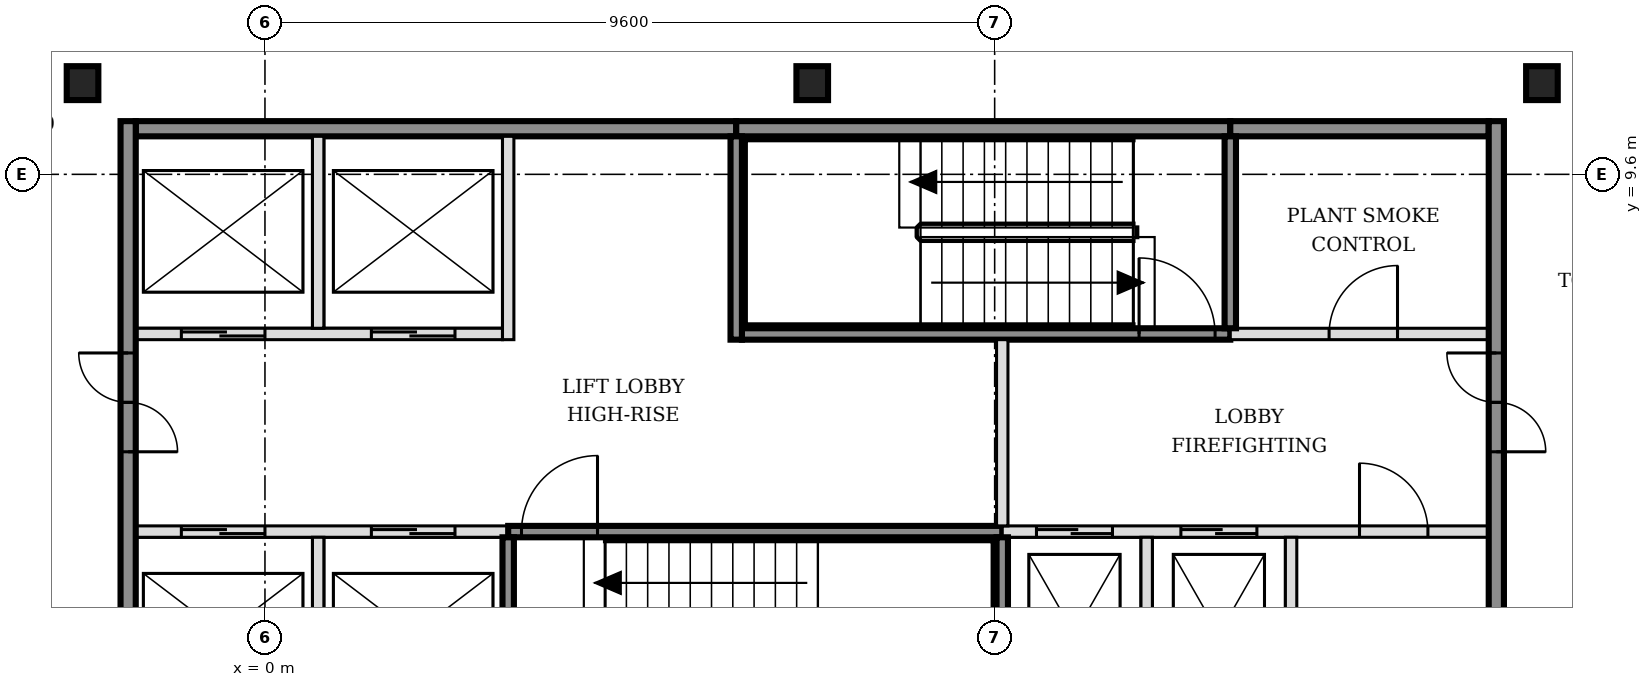
"""IFC4 building model, lengths in metres.
Left out: names, types, materials, properties, quantities, classifications, styles, units other than length and angle.
Written with IfcOpenShell. Run it as: python <this file> out.ifc"""

import sys

from ifc_helpers import new_model, si_unit, direction, frame, frame_2d, origin, origin_2d, place, context, subcontext, project, spatial, rectangle, i_section, extrude, element, fill, save


model = new_model("IFC4")
c1 = context("Model", 3, precision=1e-05, world=origin(), true_north=direction((0.0, 1.0)))
c2 = subcontext(c1, "Body", "Model", "MODEL_VIEW")
j1 = project(units=[si_unit("LENGTHUNIT", "METRE"), si_unit("PLANEANGLEUNIT", "RADIAN")], contexts=[c1])
p1 = place(None, origin())
s1 = spatial("IfcSite", under=j1, at=p1, CompositionType="ELEMENT")
p2 = place(p1, origin())
s2 = spatial("IfcBuilding", under=s1, at=p2, CompositionType="ELEMENT")
p3 = place(p2, frame((0.0, 0.0, 179.4)))
s3 = spatial("IfcBuildingStorey", under=s2, at=p3, CompositionType="ELEMENT", Elevation=179.4)
for number, where, z_axis, x_axis in (
    (1, (-2.4, 10.8, -0.15), (0.0, 0.0, 1.0), (1.0, 0.0, 0.0)),
    (2, (7.2, 10.8, -0.15), (0.0, 0.0, 1.0), (1.0, 0.0, 0.0)),
    (3, (16.8, 10.8, -0.15), (0.0, 0.0, 1.0), (1.0, 0.0, 0.0)),
):
    element("IfcColumn", number, at=place(p3, frame(where, z_axis=z_axis, x_axis=x_axis)), inside=s3, PredefinedType="COLUMN", context=c2, shape_type="SweptSolid", body=[
        extrude(i_section(OverallWidth=0.416, OverallDepth=0.446, WebThickness=0.039, FlangeThickness=0.063, FilletRadius=0.015, at=origin_2d()), origin(), (0.0, 0.0, 1.0), 3.6),
    ])
p4 = place(p3, frame((-1.7, 4.9, 0.0), z_axis=(0.0, 0.0, 1.0), x_axis=(1.0, 0.0, 0.0)))
e4 = element("IfcWall", 4, at=p4, inside=s3, PredefinedType="SOLIDWALL", context=c2, shape_type="SweptSolid", body=[
    extrude(rectangle(XDim=4.9, YDim=0.15, at=frame_2d((2.45, 0.0))), origin(), (0.0, 0.0, 1.0), 3.45),
])
p5 = place(p4, frame((0.6, 0.0, 0.0)))
e5 = element("IfcOpeningElement", 5, at=p5, cuts=e4, PredefinedType="OPENING", context=c2, shape_type="SweptSolid", body=[
    extrude(rectangle(XDim=1.1, YDim=2.1, at=frame_2d((0.55, 1.05))), frame((0.0, 0.085, 0.0), z_axis=(0.0, -1.0, 0.0), x_axis=(1.0, 0.0, 0.0)), (0.0, 0.0, 1.0), 0.17),
])
p6 = place(p4, frame((3.1, 0.0, 0.0)))
e6 = element("IfcOpeningElement", 6, at=p6, cuts=e4, PredefinedType="OPENING", context=c2, shape_type="SweptSolid", body=[
    extrude(rectangle(XDim=1.1, YDim=2.1, at=frame_2d((0.55, 1.05))), frame((0.0, 0.085, 0.0), z_axis=(0.0, -1.0, 0.0), x_axis=(1.0, 0.0, 0.0)), (0.0, 0.0, 1.0), 0.17),
])
p7 = place(p3, frame((3.2, 4.9, 0.0), z_axis=(0.0, 0.0, 1.0), x_axis=(1.0, 0.0, 0.0)))
e7 = element("IfcWall", 7, at=p7, inside=s3, PredefinedType="SOLIDWALL", context=c2, shape_type="SweptSolid", body=[
    extrude(rectangle(XDim=6.5, YDim=0.15, at=frame_2d((3.25, 0.0))), origin(), (0.0, 0.0, 1.0), 3.45),
])
p8 = place(p7, frame((0.175, 0.0, 0.0)))
e8 = element("IfcOpeningElement", 8, at=p8, cuts=e7, PredefinedType="OPENING", context=c2, shape_type="SweptSolid", body=[
    extrude(rectangle(XDim=1.0, YDim=2.1, at=frame_2d((0.5, 1.05))), frame((0.0, 0.085, 0.0), z_axis=(0.0, -1.0, 0.0), x_axis=(1.0, 0.0, 0.0)), (0.0, 0.0, 1.0), 0.17),
])
p9 = place(p3, frame((9.7, 4.9, 0.0), z_axis=(0.0, 0.0, 1.0), x_axis=(1.0, 0.0, 0.0)))
e9 = element("IfcWall", 9, at=p9, inside=s3, PredefinedType="SOLIDWALL", context=c2, shape_type="SweptSolid", body=[
    extrude(rectangle(XDim=6.4, YDim=0.15, at=frame_2d((3.2, 0.0))), origin(), (0.0, 0.0, 1.0), 3.45),
])
p10 = place(p9, frame((0.45, 0.0, 0.0)))
e10 = element("IfcOpeningElement", 10, at=p10, cuts=e9, PredefinedType="OPENING", context=c2, shape_type="SweptSolid", body=[
    extrude(rectangle(XDim=1.0, YDim=2.1, at=frame_2d((0.5, 1.05))), frame((0.0, 0.085, 0.0), z_axis=(0.0, -1.0, 0.0), x_axis=(1.0, 0.0, 0.0)), (0.0, 0.0, 1.0), 0.17),
])
p11 = place(p9, frame((2.35, 0.0, 0.0)))
e11 = element("IfcOpeningElement", 11, at=p11, cuts=e9, PredefinedType="OPENING", context=c2, shape_type="SweptSolid", body=[
    extrude(rectangle(XDim=1.0, YDim=2.1, at=frame_2d((0.5, 1.05))), frame((0.0, 0.085, 0.0), z_axis=(0.0, -1.0, 0.0), x_axis=(1.0, 0.0, 0.0)), (0.0, 0.0, 1.0), 0.17),
])
p12 = place(p9, frame((4.7, 0.0, 0.0)))
e12 = element("IfcOpeningElement", 12, at=p12, cuts=e9, PredefinedType="OPENING", context=c2, shape_type="SweptSolid", body=[
    extrude(rectangle(XDim=0.9, YDim=2.1, at=frame_2d((0.45, 1.05))), frame((0.0, 0.085, 0.0), z_axis=(0.0, -1.0, 0.0), x_axis=(1.0, 0.0, 0.0)), (0.0, 0.0, 1.0), 0.17),
])
p13 = place(p3, frame((-1.7, 7.5, 0.0), z_axis=(0.0, 0.0, 1.0), x_axis=(1.0, 0.0, 0.0)))
e13 = element("IfcWall", 13, at=p13, inside=s3, PredefinedType="SOLIDWALL", context=c2, shape_type="SweptSolid", body=[
    extrude(rectangle(XDim=4.825, YDim=0.15, at=frame_2d((2.413, 0.0))), origin(), (0.0, 0.0, 1.0), 3.45),
])
p14 = place(p13, frame((0.6, 0.0, 0.0)))
e14 = element("IfcOpeningElement", 14, at=p14, cuts=e13, PredefinedType="OPENING", context=c2, shape_type="SweptSolid", body=[
    extrude(rectangle(XDim=1.1, YDim=2.1, at=frame_2d((0.55, 1.05))), frame((0.0, 0.085, 0.0), z_axis=(0.0, -1.0, 0.0), x_axis=(1.0, 0.0, 0.0)), (0.0, 0.0, 1.0), 0.17),
])
p15 = place(p13, frame((3.1, 0.0, 0.0)))
e15 = element("IfcOpeningElement", 15, at=p15, cuts=e13, PredefinedType="OPENING", context=c2, shape_type="SweptSolid", body=[
    extrude(rectangle(XDim=1.1, YDim=2.1, at=frame_2d((0.55, 1.05))), frame((0.0, 0.085, 0.0), z_axis=(0.0, -1.0, 0.0), x_axis=(1.0, 0.0, 0.0)), (0.0, 0.0, 1.0), 0.17),
])
p16 = place(p3, frame((6.275, 7.5, 0.0), z_axis=(0.0, 0.0, 1.0), x_axis=(1.0, 0.0, 0.0)))
e16 = element("IfcWall", 16, at=p16, inside=s3, PredefinedType="SOLIDWALL", context=c2, shape_type="SweptSolid", body=[
    extrude(rectangle(XDim=6.425, YDim=0.15, at=frame_2d((3.212, 0.0))), origin(), (0.0, 0.0, 1.0), 3.45),
])
p17 = place(p16, frame((5.225, 0.0, 0.0)))
e17 = element("IfcOpeningElement", 17, at=p17, cuts=e16, PredefinedType="OPENING", context=c2, shape_type="SweptSolid", body=[
    extrude(rectangle(XDim=1.0, YDim=2.1, at=frame_2d((0.5, 1.05))), frame((0.0, 0.085, 0.0), z_axis=(0.0, -1.0, 0.0), x_axis=(1.0, 0.0, 0.0)), (0.0, 0.0, 1.0), 0.17),
])
p18 = place(p3, frame((12.7, 7.5, 0.0), z_axis=(0.0, 0.0, 1.0), x_axis=(1.0, 0.0, 0.0)))
e18 = element("IfcWall", 18, at=p18, inside=s3, PredefinedType="SOLIDWALL", context=c2, shape_type="SweptSolid", body=[
    extrude(rectangle(XDim=3.4, YDim=0.15, at=frame_2d((1.7, 0.0))), origin(), (0.0, 0.0, 1.0), 3.45),
])
p19 = place(p18, frame((1.3, 0.0, 0.0)))
e19 = element("IfcOpeningElement", 19, at=p19, cuts=e18, PredefinedType="OPENING", context=c2, shape_type="SweptSolid", body=[
    extrude(rectangle(XDim=0.9, YDim=2.1, at=frame_2d((0.45, 1.05))), frame((0.0, 0.085, 0.0), z_axis=(0.0, -1.0, 0.0), x_axis=(1.0, 0.0, 0.0)), (0.0, 0.0, 1.0), 0.17),
])
p20 = place(p3, frame((-1.7, 10.2, 0.0), z_axis=(0.0, 0.0, 1.0), x_axis=(1.0, 0.0, 0.0)))
e20 = element("IfcWall", 20, at=p20, inside=s3, PredefinedType="SOLIDWALL", context=c2, shape_type="SweptSolid", body=[
    extrude(rectangle(XDim=7.9, YDim=0.2, at=frame_2d((3.95, 0.0))), origin(), (0.0, 0.0, 1.0), 3.45),
])
p21 = place(p3, frame((6.2, 10.2, 0.0), z_axis=(0.0, 0.0, 1.0), x_axis=(1.0, 0.0, 0.0)))
e21 = element("IfcWall", 21, at=p21, inside=s3, PredefinedType="SOLIDWALL", context=c2, shape_type="SweptSolid", body=[
    extrude(rectangle(XDim=6.5, YDim=0.2, at=frame_2d((3.25, 0.0))), origin(), (0.0, 0.0, 1.0), 3.45),
])
p22 = place(p3, frame((12.7, 10.2, 0.0), z_axis=(0.0, 0.0, 1.0), x_axis=(1.0, 0.0, 0.0)))
e22 = element("IfcWall", 22, at=p22, inside=s3, PredefinedType="SOLIDWALL", context=c2, shape_type="SweptSolid", body=[
    extrude(rectangle(XDim=3.4, YDim=0.2, at=frame_2d((1.7, 0.0))), origin(), (0.0, 0.0, 1.0), 3.45),
])
p23 = place(p3, frame((-1.8, -5.5, 0.0), z_axis=(0.0, 0.0, 1.0), x_axis=(0.0, 1.0, 0.0)))
e23 = element("IfcWall", 23, at=p23, inside=s3, PredefinedType="SOLIDWALL", context=c2, shape_type="SweptSolid", body=[
    extrude(rectangle(XDim=15.8, YDim=0.2, at=frame_2d((7.9, 0.0))), origin(), (0.0, 0.0, 1.0), 3.45),
])
p24 = place(p23, frame((3.05, 0.0, 0.0)))
e24 = element("IfcOpeningElement", 24, at=p24, cuts=e23, PredefinedType="OPENING", context=c2, shape_type="SweptSolid", body=[
    extrude(rectangle(XDim=1.3, YDim=2.1, at=frame_2d((0.65, 1.05))), frame((0.0, 0.11, 0.0), z_axis=(0.0, -1.0, 0.0), x_axis=(1.0, 0.0, 0.0)), (0.0, 0.0, 1.0), 0.22),
])
p25 = place(p23, frame((11.45, 0.0, 0.0)))
e25 = element("IfcOpeningElement", 25, at=p25, cuts=e23, PredefinedType="OPENING", context=c2, shape_type="SweptSolid", body=[
    extrude(rectangle(XDim=1.3, YDim=2.1, at=frame_2d((0.65, 1.05))), frame((0.0, 0.11, 0.0), z_axis=(0.0, -1.0, 0.0), x_axis=(1.0, 0.0, 0.0)), (0.0, 0.0, 1.0), 0.22),
])
p26 = place(p3, frame((0.7, 2.275, 0.0), z_axis=(0.0, 0.0, 1.0), x_axis=(0.0, 1.0, 0.0)))
e26 = element("IfcWall", 26, at=p26, inside=s3, PredefinedType="SOLIDWALL", context=c2, shape_type="SweptSolid", body=[
    extrude(rectangle(XDim=2.55, YDim=0.15, at=frame_2d((1.275, 0.0))), origin(), (0.0, 0.0, 1.0), 3.45),
])
p27 = place(p3, frame((0.7, 7.575, 0.0), z_axis=(0.0, 0.0, 1.0), x_axis=(0.0, 1.0, 0.0)))
e27 = element("IfcWall", 27, at=p27, inside=s3, PredefinedType="SOLIDWALL", context=c2, shape_type="SweptSolid", body=[
    extrude(rectangle(XDim=2.525, YDim=0.15, at=frame_2d((1.263, 0.0))), origin(), (0.0, 0.0, 1.0), 3.45),
])
p28 = place(p3, frame((3.2, 2.275, 0.0), z_axis=(0.0, 0.0, 1.0), x_axis=(0.0, 1.0, 0.0)))
e28 = element("IfcWall", 28, at=p28, inside=s3, PredefinedType="SOLIDWALL", context=c2, shape_type="SweptSolid", body=[
    extrude(rectangle(XDim=2.55, YDim=0.15, at=frame_2d((1.275, 0.0))), origin(), (0.0, 0.0, 1.0), 3.45),
])
for number, where, z_axis, x_axis in (
    (29, (3.2, 7.425, 0.0), (0.0, 0.0, 1.0), (0.0, 1.0, 0.0)),
    (30, (6.2, 7.425, 0.0), (0.0, 0.0, 1.0), (0.0, 1.0, 0.0)),
):
    element("IfcWall", number, at=place(p3, frame(where, z_axis=z_axis, x_axis=x_axis)), inside=s3, PredefinedType="SOLIDWALL", context=c2, shape_type="SweptSolid", body=[
        extrude(rectangle(XDim=2.675, YDim=0.15, at=frame_2d((1.337, 0.0))), origin(), (0.0, 0.0, 1.0), 3.45),
    ])
p29 = place(p3, frame((9.7, 2.275, 0.0), z_axis=(0.0, 0.0, 1.0), x_axis=(0.0, 1.0, 0.0)))
e31 = element("IfcWall", 31, at=p29, inside=s3, PredefinedType="SOLIDWALL", context=c2, shape_type="SweptSolid", body=[
    extrude(rectangle(XDim=2.55, YDim=0.15, at=frame_2d((1.275, 0.0))), origin(), (0.0, 0.0, 1.0), 3.45),
])
p30 = place(p3, frame((9.7, 4.975, 0.0), z_axis=(0.0, 0.0, 1.0), x_axis=(0.0, 1.0, 0.0)))
e32 = element("IfcWall", 32, at=p30, inside=s3, PredefinedType="SOLIDWALL", context=c2, shape_type="SweptSolid", body=[
    extrude(rectangle(XDim=2.45, YDim=0.15, at=frame_2d((1.225, 0.0))), origin(), (0.0, 0.0, 1.0), 3.45),
])
p31 = place(p3, frame((11.6, 2.275, 0.0), z_axis=(0.0, 0.0, 1.0), x_axis=(0.0, 1.0, 0.0)))
e33 = element("IfcWall", 33, at=p31, inside=s3, PredefinedType="SOLIDWALL", context=c2, shape_type="SweptSolid", body=[
    extrude(rectangle(XDim=2.55, YDim=0.15, at=frame_2d((1.275, 0.0))), origin(), (0.0, 0.0, 1.0), 3.45),
])
p32 = place(p3, frame((12.7, 7.575, 0.0), z_axis=(0.0, 0.0, 1.0), x_axis=(0.0, 1.0, 0.0)))
e34 = element("IfcWall", 34, at=p32, inside=s3, PredefinedType="SOLIDWALL", context=c2, shape_type="SweptSolid", body=[
    extrude(rectangle(XDim=2.525, YDim=0.15, at=frame_2d((1.263, 0.0))), origin(), (0.0, 0.0, 1.0), 3.45),
])
p33 = place(p3, frame((13.5, 2.275, 0.0), z_axis=(0.0, 0.0, 1.0), x_axis=(0.0, 1.0, 0.0)))
e35 = element("IfcWall", 35, at=p33, inside=s3, PredefinedType="SOLIDWALL", context=c2, shape_type="SweptSolid", body=[
    extrude(rectangle(XDim=2.55, YDim=0.15, at=frame_2d((1.275, 0.0))), origin(), (0.0, 0.0, 1.0), 3.45),
])
p34 = place(p3, frame((16.2, -5.5, 0.0), z_axis=(0.0, 0.0, 1.0), x_axis=(0.0, 1.0, 0.0)))
e36 = element("IfcWall", 36, at=p34, inside=s3, PredefinedType="SOLIDWALL", context=c2, shape_type="SweptSolid", body=[
    extrude(rectangle(XDim=15.8, YDim=0.2, at=frame_2d((7.9, 0.0))), origin(), (0.0, 0.0, 1.0), 3.45),
])
p35 = place(p34, frame((3.05, 0.0, 0.0)))
e37 = element("IfcOpeningElement", 37, at=p35, cuts=e36, PredefinedType="OPENING", context=c2, shape_type="SweptSolid", body=[
    extrude(rectangle(XDim=1.3, YDim=2.1, at=frame_2d((0.65, 1.05))), frame((0.0, 0.11, 0.0), z_axis=(0.0, -1.0, 0.0), x_axis=(1.0, 0.0, 0.0)), (0.0, 0.0, 1.0), 0.22),
])
p36 = place(p34, frame((11.45, 0.0, 0.0)))
e38 = element("IfcOpeningElement", 38, at=p36, cuts=e36, PredefinedType="OPENING", context=c2, shape_type="SweptSolid", body=[
    extrude(rectangle(XDim=1.3, YDim=2.1, at=frame_2d((0.65, 1.05))), frame((0.0, 0.11, 0.0), z_axis=(0.0, -1.0, 0.0), x_axis=(1.0, 0.0, 0.0)), (0.0, 0.0, 1.0), 0.22),
])
p37 = place(p3, frame((31.072, 4.722, 0.0), z_axis=(0.0, 0.0, 1.0), x_axis=(-0.707101007496, 0.70711255483, 0.0)))
e39 = element("IfcWall", 39, at=p37, inside=s3, PredefinedType="PARTITIONING", context=c2, shape_type="SweptSolid", body=[
    extrude(rectangle(XDim=21.143, YDim=0.15, at=frame_2d((10.571, 0.0))), origin(), (0.0, 0.0, 1.0), 2.73),
])
p38 = place(p37, frame((4.108, 0.0, 0.0)))
e40 = element("IfcOpeningElement", 40, at=p38, cuts=e39, PredefinedType="OPENING", context=c2, shape_type="SweptSolid", body=[
    extrude(rectangle(XDim=0.9, YDim=2.1, at=frame_2d((0.45, 1.05))), frame((0.0, 0.085, 0.0), z_axis=(0.0, -1.0, 0.0), x_axis=(1.0, 0.0, 0.0)), (0.0, 0.0, 1.0), 0.17),
])
p39 = place(p37, frame((11.367, 0.0, 0.0)))
e41 = element("IfcOpeningElement", 41, at=p39, cuts=e39, PredefinedType="OPENING", context=c2, shape_type="SweptSolid", body=[
    extrude(rectangle(XDim=0.9, YDim=2.1, at=frame_2d((0.45, 1.05))), frame((0.0, 0.085, 0.0), z_axis=(0.0, -1.0, 0.0), x_axis=(1.0, 0.0, 0.0)), (0.0, 0.0, 1.0), 0.17),
])
p40 = place(p37, frame((16.556, 0.0, 0.0)))
e42 = element("IfcOpeningElement", 42, at=p40, cuts=e39, PredefinedType="OPENING", context=c2, shape_type="SweptSolid", body=[
    extrude(rectangle(XDim=0.9, YDim=2.1, at=frame_2d((0.45, 1.05))), frame((0.0, 0.085, 0.0), z_axis=(0.0, -1.0, 0.0), x_axis=(1.0, 0.0, 0.0)), (0.0, 0.0, 1.0), 0.17),
])
p41 = place(p3, frame((-14.475, 6.919, 0.0), z_axis=(0.0, 0.0, 1.0), x_axis=(0.707106781187, 0.707106781187, 0.0)))
e43 = element("IfcWall", 43, at=p41, inside=s3, PredefinedType="PARTITIONING", context=c2, shape_type="SweptSolid", body=[
    extrude(rectangle(XDim=18.036, YDim=0.15, at=frame_2d((9.018, 0.0))), origin(), (0.0, 0.0, 1.0), 2.73),
])
p42 = place(p41, frame((15.683, 0.0, 0.0)))
e44 = element("IfcOpeningElement", 44, at=p42, cuts=e43, PredefinedType="OPENING", context=c2, shape_type="SweptSolid", body=[
    extrude(rectangle(XDim=0.9, YDim=2.1, at=frame_2d((0.45, 1.05))), frame((0.0, 0.085, 0.0), z_axis=(0.0, -1.0, 0.0), x_axis=(1.0, 0.0, 0.0)), (0.0, 0.0, 1.0), 0.17),
])
p43 = place(p41, frame((10.33, 0.0, 0.0)))
e45 = element("IfcOpeningElement", 45, at=p43, cuts=e43, PredefinedType="OPENING", context=c2, shape_type="SweptSolid", body=[
    extrude(rectangle(XDim=0.9, YDim=2.1, at=frame_2d((0.45, 1.05))), frame((0.0, 0.085, 0.0), z_axis=(0.0, -1.0, 0.0), x_axis=(1.0, 0.0, 0.0)), (0.0, 0.0, 1.0), 0.17),
])
p44 = place(p41, frame((5.2, 0.0, 0.0)))
e46 = element("IfcOpeningElement", 46, at=p44, cuts=e43, PredefinedType="OPENING", context=c2, shape_type="SweptSolid", body=[
    extrude(rectangle(XDim=0.9, YDim=2.1, at=frame_2d((0.45, 1.05))), frame((0.0, 0.085, 0.0), z_axis=(0.0, -1.0, 0.0), x_axis=(1.0, 0.0, 0.0)), (0.0, 0.0, 1.0), 0.17),
])
p45 = place(p41, frame((1.499, 0.0, 0.0)))
e47 = element("IfcOpeningElement", 47, at=p45, cuts=e43, PredefinedType="OPENING", context=c2, shape_type="SweptSolid", body=[
    extrude(rectangle(XDim=0.9, YDim=2.1, at=frame_2d((0.45, 1.05))), frame((0.0, 0.085, 0.0), z_axis=(0.0, -1.0, 0.0), x_axis=(1.0, 0.0, 0.0)), (0.0, 0.0, 1.0), 0.17),
])
p46 = place(p5, origin())
e48 = element("IfcDoor", 48, at=p46, inside=s3, OperationType="DOUBLE_DOOR_SLIDING", PredefinedType="DOOR", context=c2, shape_type="SweptSolid", body=[
    extrude(rectangle(XDim=1.1, YDim=2.1, at=frame_2d((0.55, 1.05))), frame((0.0, 0.025, 0.0), z_axis=(0.0, -1.0, 0.0), x_axis=(1.0, 0.0, 0.0)), (0.0, 0.0, 1.0), 0.05),
])
fill(e5, e48)
p47 = place(p6, origin())
e49 = element("IfcDoor", 49, at=p47, inside=s3, OperationType="DOUBLE_DOOR_SLIDING", PredefinedType="DOOR", context=c2, shape_type="SweptSolid", body=[
    extrude(rectangle(XDim=1.1, YDim=2.1, at=frame_2d((0.55, 1.05))), frame((0.0, 0.025, 0.0), z_axis=(0.0, -1.0, 0.0), x_axis=(1.0, 0.0, 0.0)), (0.0, 0.0, 1.0), 0.05),
])
fill(e6, e49)
p48 = place(p14, origin())
e50 = element("IfcDoor", 50, at=p48, inside=s3, OperationType="DOUBLE_DOOR_SLIDING", PredefinedType="DOOR", context=c2, shape_type="SweptSolid", body=[
    extrude(rectangle(XDim=1.1, YDim=2.1, at=frame_2d((0.55, 1.05))), frame((0.0, 0.025, 0.0), z_axis=(0.0, -1.0, 0.0), x_axis=(1.0, 0.0, 0.0)), (0.0, 0.0, 1.0), 0.05),
])
fill(e14, e50)
p49 = place(p15, origin())
e51 = element("IfcDoor", 51, at=p49, inside=s3, OperationType="DOUBLE_DOOR_SLIDING", PredefinedType="DOOR", context=c2, shape_type="SweptSolid", body=[
    extrude(rectangle(XDim=1.1, YDim=2.1, at=frame_2d((0.55, 1.05))), frame((0.0, 0.025, 0.0), z_axis=(0.0, -1.0, 0.0), x_axis=(1.0, 0.0, 0.0)), (0.0, 0.0, 1.0), 0.05),
])
fill(e15, e51)
p50 = place(p10, origin())
e52 = element("IfcDoor", 52, at=p50, inside=s3, OperationType="DOUBLE_DOOR_SLIDING", PredefinedType="DOOR", context=c2, shape_type="SweptSolid", body=[
    extrude(rectangle(XDim=1.0, YDim=2.1, at=frame_2d((0.5, 1.05))), frame((0.0, 0.025, 0.0), z_axis=(0.0, -1.0, 0.0), x_axis=(1.0, 0.0, 0.0)), (0.0, 0.0, 1.0), 0.05),
])
fill(e10, e52)
p51 = place(p11, origin())
e53 = element("IfcDoor", 53, at=p51, inside=s3, OperationType="DOUBLE_DOOR_SLIDING", PredefinedType="DOOR", context=c2, shape_type="SweptSolid", body=[
    extrude(rectangle(XDim=1.0, YDim=2.1, at=frame_2d((0.5, 1.05))), frame((0.0, 0.025, 0.0), z_axis=(0.0, -1.0, 0.0), x_axis=(1.0, 0.0, 0.0)), (0.0, 0.0, 1.0), 0.05),
])
fill(e11, e53)
p52 = place(p8, origin())
e54 = element("IfcDoor", 54, at=p52, inside=s3, OperationType="SINGLE_SWING_RIGHT", PredefinedType="DOOR", context=c2, shape_type="SweptSolid", body=[
    extrude(rectangle(XDim=1.0, YDim=2.1, at=frame_2d((0.5, 1.05))), frame((0.0, 0.025, 0.0), z_axis=(0.0, -1.0, 0.0), x_axis=(1.0, 0.0, 0.0)), (0.0, 0.0, 1.0), 0.05),
])
fill(e8, e54)
p53 = place(p17, origin())
e55 = element("IfcDoor", 55, at=p53, inside=s3, OperationType="SINGLE_SWING_LEFT", PredefinedType="DOOR", context=c2, shape_type="SweptSolid", body=[
    extrude(rectangle(XDim=1.0, YDim=2.1, at=frame_2d((0.5, 1.05))), frame((0.0, 0.025, 0.0), z_axis=(0.0, -1.0, 0.0), x_axis=(1.0, 0.0, 0.0)), (0.0, 0.0, 1.0), 0.05),
])
fill(e17, e55)
p54 = place(p25, origin())
e56 = element("IfcDoor", 56, at=p54, inside=s3, OperationType="DOUBLE_DOOR_SINGLE_SWING", PredefinedType="DOOR", context=c2, shape_type="SweptSolid", body=[
    extrude(rectangle(XDim=1.3, YDim=2.1, at=frame_2d((0.65, 1.05))), frame((0.0, 0.025, 0.0), z_axis=(0.0, -1.0, 0.0), x_axis=(1.0, 0.0, 0.0)), (0.0, 0.0, 1.0), 0.05),
])
fill(e25, e56)
p55 = place(p36, origin())
e57 = element("IfcDoor", 57, at=p55, inside=s3, OperationType="DOUBLE_DOOR_SINGLE_SWING", PredefinedType="DOOR", context=c2, shape_type="SweptSolid", body=[
    extrude(rectangle(XDim=1.3, YDim=2.1, at=frame_2d((0.65, 1.05))), frame((0.0, 0.025, 0.0), z_axis=(0.0, -1.0, 0.0), x_axis=(1.0, 0.0, 0.0)), (0.0, 0.0, 1.0), 0.05),
])
fill(e38, e57)
p56 = place(p12, origin())
e58 = element("IfcDoor", 58, at=p56, inside=s3, OperationType="SINGLE_SWING_LEFT", PredefinedType="DOOR", context=c2, shape_type="SweptSolid", body=[
    extrude(rectangle(XDim=0.9, YDim=2.1, at=frame_2d((0.45, 1.05))), frame((0.0, 0.025, 0.0), z_axis=(0.0, -1.0, 0.0), x_axis=(1.0, 0.0, 0.0)), (0.0, 0.0, 1.0), 0.05),
])
fill(e12, e58)
p57 = place(p19, origin())
e59 = element("IfcDoor", 59, at=p57, inside=s3, OperationType="SINGLE_SWING_RIGHT", PredefinedType="DOOR", context=c2, shape_type="SweptSolid", body=[
    extrude(rectangle(XDim=0.9, YDim=2.1, at=frame_2d((0.45, 1.05))), frame((0.0, 0.025, 0.0), z_axis=(0.0, -1.0, 0.0), x_axis=(1.0, 0.0, 0.0)), (0.0, 0.0, 1.0), 0.05),
])
fill(e19, e59)
save(model, sys.argv[1])
